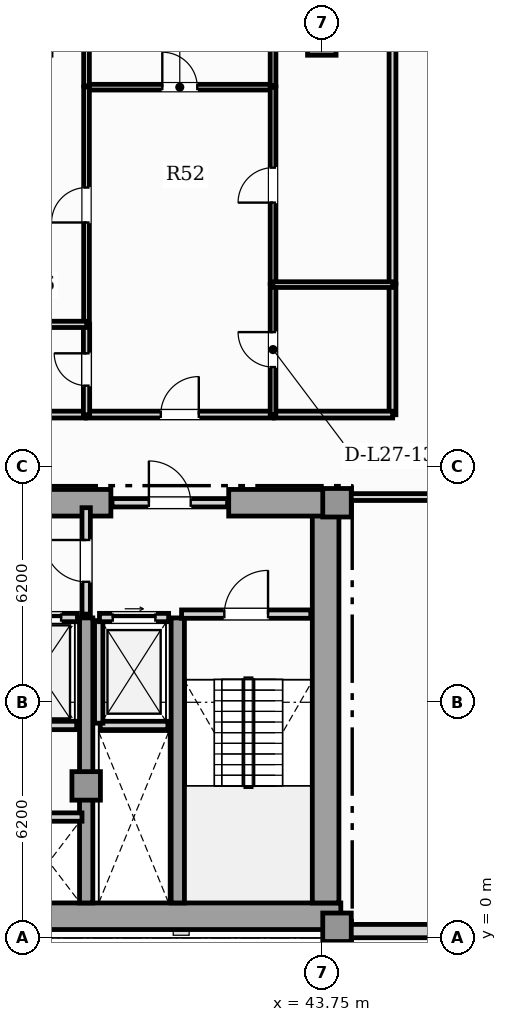
"""IFC4 building model, lengths in metres.
Left out: names, types, materials, properties, quantities, classifications, styles, units other than length and angle.
Written with IfcOpenShell. Run it as: python <this file> out.ifc"""

import sys

from ifc_helpers import new_model, si_unit, direction, frame, frame_2d, origin, origin_2d, place, context, subcontext, project, spatial, rectangle, extrude, element, fill, save


model = new_model("IFC4")
c1 = context("Model", 3, precision=1e-05, world=origin(), true_north=direction((0.0, 1.0)))
c2 = subcontext(c1, "Body", "Model", "MODEL_VIEW")
j1 = project(units=[si_unit("LENGTHUNIT", "METRE"), si_unit("PLANEANGLEUNIT", "RADIAN")], contexts=[c1])
p1 = place(None, origin())
s1 = spatial("IfcSite", under=j1, at=p1, CompositionType="ELEMENT")
p2 = place(p1, origin())
s2 = spatial("IfcBuilding", under=s1, at=p2, CompositionType="ELEMENT")
p3 = place(p2, frame((0.0, 0.0, 111.85)))
s3 = spatial("IfcBuildingStorey", under=s2, at=p3, CompositionType="ELEMENT", Elevation=111.85)
p4 = place(p3, frame((13.25, 0.57, 0.0), z_axis=(0.0, 0.0, 1.0), x_axis=(1.0, 0.0, 0.0)))
e1 = element("IfcWall", 1, at=p4, inside=s3, PredefinedType="SHEAR", context=c2, shape_type="SweptSolid", body=[
    extrude(rectangle(XDim=31.0, YDim=0.7, at=frame_2d((15.5, 0.0))), origin(), (0.0, 0.0, 1.0), 3.6),
])
p5 = place(p3, frame((43.85, 0.92, 0.0), z_axis=(0.0, 0.0, 1.0), x_axis=(0.0, 1.0, 0.0)))
e2 = element("IfcWall", 2, at=p5, inside=s3, PredefinedType="SHEAR", context=c2, shape_type="SweptSolid", body=[
    extrude(rectangle(XDim=10.53, YDim=0.7, at=frame_2d((5.265, 0.0))), origin(), (0.0, 0.0, 1.0), 3.6),
])
p6 = place(p3, frame((30.9, 11.45, 0.0), z_axis=(0.0, 0.0, 1.0), x_axis=(1.0, 0.0, 0.0)))
e3 = element("IfcWall", 3, at=p6, inside=s3, PredefinedType="SHEAR", context=c2, shape_type="SweptSolid", body=[
    extrude(rectangle(XDim=7.3, YDim=0.7, at=frame_2d((3.65, 0.0))), origin(), (0.0, 0.0, 1.0), 3.6),
])
p7 = place(p3, frame((41.3, 11.45, 0.0), z_axis=(0.0, 0.0, 1.0), x_axis=(1.0, 0.0, 0.0)))
e4 = element("IfcWall", 4, at=p7, inside=s3, PredefinedType="SHEAR", context=c2, shape_type="SweptSolid", body=[
    extrude(rectangle(XDim=2.95, YDim=0.7, at=frame_2d((1.475, 0.0))), origin(), (0.0, 0.0, 1.0), 3.6),
])
for number, where, z_axis, x_axis in (
    (5, (37.55, 0.92, 0.0), (0.0, 0.0, 1.0), (0.0, 1.0, 0.0)),
    (6, (39.96, 0.92, 0.0), (0.0, 0.0, 1.0), (0.0, 1.0, 0.0)),
):
    element("IfcWall", number, at=place(p3, frame(where, z_axis=z_axis, x_axis=x_axis)), inside=s3, PredefinedType="SHEAR", context=c2, shape_type="SweptSolid", body=[
        extrude(rectangle(XDim=7.5, YDim=0.35, at=frame_2d((3.75, 0.0))), origin(), (0.0, 0.0, 1.0), 3.6),
    ])
for number, where, z_axis, x_axis in (
    (7, (44.15, 0.28, 0.0), (0.0, 0.0, 1.0), (1.0, 0.0, 0.0)),
    (8, (44.15, 11.45, 0.0), (0.0, 0.0, 1.0), (1.0, 0.0, 0.0)),
    (9, (37.55, 4.0, 0.0), (0.0, 0.0, 1.0), (1.0, 0.0, 0.0)),
    (10, (43.75, 23.6, 0.0), (0.0, 0.0, 1.0), (1.0, 0.0, 0.0)),
):
    element("IfcColumn", number, at=place(p3, frame(where, z_axis=z_axis, x_axis=x_axis)), inside=s3, PredefinedType="COLUMN", context=c2, shape_type="SweptSolid", body=[
        extrude(rectangle(XDim=0.75, YDim=0.75, at=origin_2d()), origin(), (0.0, 0.0, 1.0), 3.85),
    ])
p8 = place(p3, frame((44.25, 0.18, 0.0), z_axis=(0.0, 0.0, 1.0), x_axis=(1.0, 0.0, 0.0)))
e11 = element("IfcWall", 11, at=p8, inside=s3, PredefinedType="SOLIDWALL", context=c2, shape_type="SweptSolid", body=[
    extrude(rectangle(XDim=7.41, YDim=0.35, at=frame_2d((3.705, 0.0))), origin(), (0.0, 0.0, 1.0), 3.6),
])
p9 = place(p8, frame((2.88, 0.0, 0.88)))
e12 = element("IfcOpeningElement", 12, at=p9, cuts=e11, PredefinedType="OPENING", context=c2, shape_type="SweptSolid", body=[
    extrude(rectangle(XDim=1.65, YDim=2.0, at=frame_2d((0.825, 1.0))), frame((0.0, 0.185, 0.0), z_axis=(0.0, -1.0, 0.0), x_axis=(1.0, 0.0, 0.0)), (0.0, 0.0, 1.0), 0.37),
])
p10 = place(p3, frame((37.92, 5.59, 0.0), z_axis=(0.0, 0.0, 1.0), x_axis=(1.0, 0.0, 0.0)))
e13 = element("IfcWall", 13, at=p10, inside=s3, PredefinedType="SOLIDWALL", context=c2, shape_type="SweptSolid", body=[
    extrude(rectangle(XDim=1.78, YDim=0.22, at=frame_2d((0.89, 0.0))), origin(), (0.0, 0.0, 1.0), 3.6),
])
p11 = place(p3, frame((37.88, 5.65, 0.0), z_axis=(0.0, 0.0, 1.0), x_axis=(0.0, 1.0, 0.0)))
e14 = element("IfcWall", 14, at=p11, inside=s3, PredefinedType="SOLIDWALL", context=c2, shape_type="SweptSolid", body=[
    extrude(rectangle(XDim=2.7, YDim=0.22, at=frame_2d((1.35, 0.0))), origin(), (0.0, 0.0, 1.0), 3.6),
])
p12 = place(p3, frame((37.9, 8.43, 0.0), z_axis=(0.0, 0.0, 1.0), x_axis=(1.0, 0.0, 0.0)))
e15 = element("IfcWall", 15, at=p12, inside=s3, PredefinedType="SOLIDWALL", context=c2, shape_type="SweptSolid", body=[
    extrude(rectangle(XDim=1.82, YDim=0.22, at=frame_2d((0.91, 0.0))), origin(), (0.0, 0.0, 1.0), 3.6),
])
p13 = place(p12, frame((0.35, 0.0, 0.0)))
e16 = element("IfcOpeningElement", 16, at=p13, cuts=e15, PredefinedType="OPENING", context=c2, shape_type="SweptSolid", body=[
    extrude(rectangle(XDim=1.12, YDim=2.25, at=frame_2d((0.56, 1.125))), frame((0.0, 0.12, 0.0), z_axis=(0.0, -1.0, 0.0), x_axis=(1.0, 0.0, 0.0)), (0.0, 0.0, 1.0), 0.24),
])
p14 = place(p3, frame((35.3, 5.59, 0.0), z_axis=(0.0, 0.0, 1.0), x_axis=(1.0, 0.0, 0.0)))
e17 = element("IfcWall", 17, at=p14, inside=s3, PredefinedType="SOLIDWALL", context=c2, shape_type="SweptSolid", body=[
    extrude(rectangle(XDim=2.0, YDim=0.22, at=frame_2d((1.0, 0.0))), origin(), (0.0, 0.0, 1.0), 3.6),
])
p15 = place(p3, frame((35.28, 8.43, 0.0), z_axis=(0.0, 0.0, 1.0), x_axis=(1.0, 0.0, 0.0)))
e18 = element("IfcWall", 18, at=p15, inside=s3, PredefinedType="SOLIDWALL", context=c2, shape_type="SweptSolid", body=[
    extrude(rectangle(XDim=2.04, YDim=0.22, at=frame_2d((1.02, 0.0))), origin(), (0.0, 0.0, 1.0), 3.6),
])
p16 = place(p15, frame((0.43, 0.0, 0.0)))
e19 = element("IfcOpeningElement", 19, at=p16, cuts=e18, PredefinedType="OPENING", context=c2, shape_type="SweptSolid", body=[
    extrude(rectangle(XDim=1.18, YDim=2.2, at=frame_2d((0.59, 1.1))), frame((0.0, 0.12, 0.0), z_axis=(0.0, -1.0, 0.0), x_axis=(1.0, 0.0, 0.0)), (0.0, 0.0, 1.0), 0.24),
])
p17 = place(p3, frame((35.7, 3.18, 0.0), z_axis=(0.0, 0.0, 1.0), x_axis=(1.0, 0.0, 0.0)))
e20 = element("IfcWall", 20, at=p17, inside=s3, PredefinedType="SOLIDWALL", context=c2, shape_type="SweptSolid", body=[
    extrude(rectangle(XDim=1.74, YDim=0.22, at=frame_2d((0.87, 0.0))), origin(), (0.0, 0.0, 1.0), 3.6),
])
p18 = place(p3, frame((40.06, 8.52, 0.0), z_axis=(0.0, 0.0, 1.0), x_axis=(1.0, 0.0, 0.0)))
e21 = element("IfcWall", 21, at=p18, inside=s3, PredefinedType="SOLIDWALL", context=c2, shape_type="SweptSolid", body=[
    extrude(rectangle(XDim=3.4, YDim=0.22, at=frame_2d((1.7, 0.0))), origin(), (0.0, 0.0, 1.0), 3.6),
])
p19 = place(p18, frame((1.125, 0.0, 0.0)))
e22 = element("IfcOpeningElement", 22, at=p19, cuts=e21, PredefinedType="OPENING", context=c2, shape_type="SweptSolid", body=[
    extrude(rectangle(XDim=1.15, YDim=2.2, at=frame_2d((0.575, 1.1))), frame((0.0, 0.12, 0.0), z_axis=(0.0, -1.0, 0.0), x_axis=(1.0, 0.0, 0.0)), (0.0, 0.0, 1.0), 0.24),
])
p20 = place(p3, frame((37.55, 8.52, 0.0), z_axis=(0.0, 0.0, 1.0), x_axis=(0.0, 1.0, 0.0)))
e23 = element("IfcWall", 23, at=p20, inside=s3, PredefinedType="SOLIDWALL", context=c2, shape_type="SweptSolid", body=[
    extrude(rectangle(XDim=2.8, YDim=0.22, at=frame_2d((1.4, 0.0))), origin(), (0.0, 0.0, 1.0), 3.055),
])
p21 = place(p20, frame((0.85, 0.0, 0.0)))
e24 = element("IfcOpeningElement", 24, at=p21, cuts=e23, PredefinedType="OPENING", context=c2, shape_type="SweptSolid", body=[
    extrude(rectangle(XDim=1.1, YDim=2.2, at=frame_2d((0.55, 1.1))), frame((0.0, 0.12, 0.0), z_axis=(0.0, -1.0, 0.0), x_axis=(1.0, 0.0, 0.0)), (0.0, 0.0, 1.0), 0.24),
])
p22 = place(p3, frame((38.23, 11.45, 0.0), z_axis=(0.0, 0.0, 1.0), x_axis=(1.0, 0.0, 0.0)))
e25 = element("IfcWall", 25, at=p22, inside=s3, PredefinedType="SOLIDWALL", context=c2, shape_type="SweptSolid", body=[
    extrude(rectangle(XDim=3.04, YDim=0.22, at=frame_2d((1.52, 0.0))), origin(), (0.0, 0.0, 1.0), 3.6),
])
p23 = place(p22, frame((0.97, 0.0, 0.0)))
e26 = element("IfcOpeningElement", 26, at=p23, cuts=e25, PredefinedType="OPENING", context=c2, shape_type="SweptSolid", body=[
    extrude(rectangle(XDim=1.1, YDim=2.2, at=frame_2d((0.55, 1.1))), frame((0.0, 0.12, 0.0), z_axis=(0.0, -1.0, 0.0), x_axis=(1.0, 0.0, 0.0)), (0.0, 0.0, 1.0), 0.24),
])
p24 = place(p3, frame((44.355, 11.6, 0.0), z_axis=(0.0, 0.0, 1.0), x_axis=(1.0, 0.0, 0.0)))
e27 = element("IfcWall", 27, at=p24, inside=s3, PredefinedType="PARTITIONING", context=c2, shape_type="SweptSolid", body=[
    extrude(rectangle(XDim=10.335, YDim=0.18, at=frame_2d((5.167, 0.0))), origin(), (0.0, 0.0, 1.0), 3.6),
])
p25 = place(p24, frame((4.667, 0.0, 0.0)))
e28 = element("IfcOpeningElement", 28, at=p25, cuts=e27, PredefinedType="OPENING", context=c2, shape_type="SweptSolid", body=[
    extrude(rectangle(XDim=1.0, YDim=2.15, at=frame_2d((0.5, 1.075))), frame((0.0, 0.1, 0.0), z_axis=(0.0, -1.0, 0.0), x_axis=(1.0, 0.0, 0.0)), (0.0, 0.0, 1.0), 0.2),
])
p26 = place(p3, frame((37.554, 13.77, 0.0), z_axis=(0.0, 0.0, 1.0), x_axis=(1.0, 0.0, 0.0)))
e29 = element("IfcWall", 29, at=p26, inside=s3, PredefinedType="PARTITIONING", context=c2, shape_type="SweptSolid", body=[
    extrude(rectangle(XDim=4.917, YDim=0.18, at=frame_2d((2.459, 0.0))), origin(), (0.0, 0.0, 1.0), 3.6),
])
p27 = place(p26, frame((1.959, 0.0, 0.0)))
e30 = element("IfcOpeningElement", 30, at=p27, cuts=e29, PredefinedType="OPENING", context=c2, shape_type="SweptSolid", body=[
    extrude(rectangle(XDim=1.0, YDim=2.15, at=frame_2d((0.5, 1.075))), frame((0.0, 0.1, 0.0), z_axis=(0.0, -1.0, 0.0), x_axis=(1.0, 0.0, 0.0)), (0.0, 0.0, 1.0), 0.2),
])
p28 = place(p3, frame((34.405, 13.77, 0.0), z_axis=(0.0, 0.0, 1.0), x_axis=(1.0, 0.0, 0.0)))
e31 = element("IfcWall", 31, at=p28, inside=s3, PredefinedType="PARTITIONING", context=c2, shape_type="SweptSolid", body=[
    extrude(rectangle(XDim=3.119, YDim=0.18, at=frame_2d((1.56, 0.0))), origin(), (0.0, 0.0, 1.0), 3.6),
])
p29 = place(p3, frame((45.61, 13.765, 0.0), z_axis=(0.0, 0.0, 1.0), x_axis=(0.0, 1.0, 0.0)))
e32 = element("IfcWall", 32, at=p29, inside=s3, PredefinedType="PARTITIONING", context=c2, shape_type="SweptSolid", body=[
    extrude(rectangle(XDim=3.43, YDim=0.18, at=frame_2d((1.715, 0.0))), origin(), (0.0, 0.0, 1.0), 3.6),
])
p30 = place(p3, frame((42.502, 13.77, 0.0), z_axis=(0.0, 0.0, 1.0), x_axis=(1.0, 0.0, 0.0)))
e33 = element("IfcWall", 33, at=p30, inside=s3, PredefinedType="PARTITIONING", context=c2, shape_type="SweptSolid", body=[
    extrude(rectangle(XDim=3.113, YDim=0.18, at=frame_2d((1.557, 0.0))), origin(), (0.0, 0.0, 1.0), 3.6),
])
p31 = place(p3, frame((45.61, 17.225, 0.0), z_axis=(0.0, 0.0, 1.0), x_axis=(0.0, 1.0, 0.0)))
e34 = element("IfcWall", 34, at=p31, inside=s3, PredefinedType="PARTITIONING", context=c2, shape_type="SweptSolid", body=[
    extrude(rectangle(XDim=10.67, YDim=0.18, at=frame_2d((5.335, 0.0))), origin(), (0.0, 0.0, 1.0), 3.6),
])
p32 = place(p3, frame((37.554, 22.385, 0.0), z_axis=(0.0, 0.0, 1.0), x_axis=(1.0, 0.0, 0.0)))
e35 = element("IfcWall", 35, at=p32, inside=s3, PredefinedType="PARTITIONING", context=c2, shape_type="SweptSolid", body=[
    extrude(rectangle(XDim=4.917, YDim=0.15, at=frame_2d((2.459, 0.0))), origin(), (0.0, 0.0, 1.0), 3.6),
])
p33 = place(p32, frame((1.999, 0.0, 0.0)))
e36 = element("IfcOpeningElement", 36, at=p33, cuts=e35, PredefinedType="OPENING", context=c2, shape_type="SweptSolid", body=[
    extrude(rectangle(XDim=0.92, YDim=2.1, at=frame_2d((0.46, 1.05))), frame((0.0, 0.085, 0.0), z_axis=(0.0, -1.0, 0.0), x_axis=(1.0, 0.0, 0.0)), (0.0, 0.0, 1.0), 0.17),
])
p34 = place(p3, frame((37.559, 13.765, 0.0), z_axis=(0.0, 0.0, 1.0), x_axis=(0.0, 1.0, 0.0)))
e37 = element("IfcWall", 37, at=p34, inside=s3, PredefinedType="PLUMBINGWALL", context=c2, shape_type="SweptSolid", body=[
    extrude(rectangle(XDim=2.383, YDim=0.165, at=frame_2d((1.192, 0.0))), origin(), (0.0, 0.0, 1.0), 3.6),
])
p35 = place(p34, frame((0.767, 0.0, 0.0)))
e38 = element("IfcOpeningElement", 38, at=p35, cuts=e37, PredefinedType="OPENING", context=c2, shape_type="SweptSolid", body=[
    extrude(rectangle(XDim=0.85, YDim=2.1, at=frame_2d((0.425, 1.05))), frame((0.0, 0.093, 0.0), z_axis=(0.0, -1.0, 0.0), x_axis=(1.0, 0.0, 0.0)), (0.0, 0.0, 1.0), 0.185),
])
p36 = place(p3, frame((37.559, 16.178, 0.0), z_axis=(0.0, 0.0, 1.0), x_axis=(0.0, 1.0, 0.0)))
e39 = element("IfcWall", 39, at=p36, inside=s3, PredefinedType="PARTITIONING", context=c2, shape_type="SweptSolid", body=[
    extrude(rectangle(XDim=6.211, YDim=0.15, at=frame_2d((3.105, 0.0))), origin(), (0.0, 0.0, 1.0), 3.6),
])
p37 = place(p36, frame((2.646, 0.0, 0.0)))
e40 = element("IfcOpeningElement", 40, at=p37, cuts=e39, PredefinedType="OPENING", context=c2, shape_type="SweptSolid", body=[
    extrude(rectangle(XDim=0.92, YDim=2.1, at=frame_2d((0.46, 1.05))), frame((0.0, 0.085, 0.0), z_axis=(0.0, -1.0, 0.0), x_axis=(1.0, 0.0, 0.0)), (0.0, 0.0, 1.0), 0.17),
])
p38 = place(p3, frame((42.467, 13.765, 0.0), z_axis=(0.0, 0.0, 1.0), x_axis=(0.0, 1.0, 0.0)))
e41 = element("IfcWall", 41, at=p38, inside=s3, PredefinedType="PARTITIONING", context=c2, shape_type="SweptSolid", body=[
    extrude(rectangle(XDim=3.43, YDim=0.15, at=frame_2d((1.715, 0.0))), origin(), (0.0, 0.0, 1.0), 3.6),
])
p39 = place(p38, frame((1.255, 0.0, 0.0)))
e42 = element("IfcOpeningElement", 42, at=p39, cuts=e41, PredefinedType="OPENING", context=c2, shape_type="SweptSolid", body=[
    extrude(rectangle(XDim=0.92, YDim=2.1, at=frame_2d((0.46, 1.05))), frame((0.0, 0.085, 0.0), z_axis=(0.0, -1.0, 0.0), x_axis=(1.0, 0.0, 0.0)), (0.0, 0.0, 1.0), 0.17),
])
p40 = place(p3, frame((42.467, 17.225, 0.0), z_axis=(0.0, 0.0, 1.0), x_axis=(0.0, 1.0, 0.0)))
e43 = element("IfcWall", 43, at=p40, inside=s3, PredefinedType="PARTITIONING", context=c2, shape_type="SweptSolid", body=[
    extrude(rectangle(XDim=5.165, YDim=0.15, at=frame_2d((2.583, 0.0))), origin(), (0.0, 0.0, 1.0), 3.6),
])
p41 = place(p40, frame((2.122, 0.0, 0.0)))
e44 = element("IfcOpeningElement", 44, at=p41, cuts=e43, PredefinedType="OPENING", context=c2, shape_type="SweptSolid", body=[
    extrude(rectangle(XDim=0.92, YDim=2.1, at=frame_2d((0.46, 1.05))), frame((0.0, 0.085, 0.0), z_axis=(0.0, -1.0, 0.0), x_axis=(1.0, 0.0, 0.0)), (0.0, 0.0, 1.0), 0.17),
])
p42 = place(p3, frame((37.559, 22.419, 0.0), z_axis=(0.0, 0.0, 1.0), x_axis=(0.0, 1.0, 0.0)))
e45 = element("IfcWall", 45, at=p42, inside=s3, PredefinedType="PARTITIONING", context=c2, shape_type="SweptSolid", body=[
    extrude(rectangle(XDim=11.085, YDim=0.15, at=frame_2d((5.543, 0.0))), origin(), (0.0, 0.0, 1.0), 3.6),
])
p43 = place(p42, frame((3.42, 0.0, 0.0)))
e46 = element("IfcOpeningElement", 46, at=p43, cuts=e45, PredefinedType="OPENING", context=c2, shape_type="SweptSolid", body=[
    extrude(rectangle(XDim=0.92, YDim=2.1, at=frame_2d((0.46, 1.05))), frame((0.0, 0.085, 0.0), z_axis=(0.0, -1.0, 0.0), x_axis=(1.0, 0.0, 0.0)), (0.0, 0.0, 1.0), 0.17),
])
p44 = place(p3, frame((42.467, 22.419, 0.0), z_axis=(0.0, 0.0, 1.0), x_axis=(0.0, 1.0, 0.0)))
e47 = element("IfcWall", 47, at=p44, inside=s3, PredefinedType="PARTITIONING", context=c2, shape_type="SweptSolid", body=[
    extrude(rectangle(XDim=11.085, YDim=0.15, at=frame_2d((5.543, 0.0))), origin(), (0.0, 0.0, 1.0), 3.6),
])
p45 = place(p44, frame((3.42, 0.0, 0.0)))
e48 = element("IfcOpeningElement", 48, at=p45, cuts=e47, PredefinedType="OPENING", context=c2, shape_type="SweptSolid", body=[
    extrude(rectangle(XDim=0.92, YDim=2.1, at=frame_2d((0.46, 1.05))), frame((0.0, 0.085, 0.0), z_axis=(0.0, -1.0, 0.0), x_axis=(1.0, 0.0, 0.0)), (0.0, 0.0, 1.0), 0.17),
])
p46 = place(p3, frame((34.365, 16.143, 0.0), z_axis=(0.0, 0.0, 1.0), x_axis=(1.0, 0.0, 0.0)))
e49 = element("IfcWall", 49, at=p46, inside=s3, PredefinedType="PLUMBINGWALL", context=c2, shape_type="SweptSolid", body=[
    extrude(rectangle(XDim=3.199, YDim=0.165, at=frame_2d((1.6, 0.0))), origin(), (0.0, 0.0, 1.0), 3.6),
])
p47 = place(p3, frame((42.462, 17.19, 0.0), z_axis=(0.0, 0.0, 1.0), x_axis=(1.0, 0.0, 0.0)))
e50 = element("IfcWall", 50, at=p47, inside=s3, PredefinedType="PARTITIONING", context=c2, shape_type="SweptSolid", body=[
    extrude(rectangle(XDim=3.153, YDim=0.15, at=frame_2d((1.577, 0.0))), origin(), (0.0, 0.0, 1.0), 3.6),
])
p48 = place(p13, origin())
e51 = element("IfcDoor", 51, at=p48, inside=s3, OperationType="SLIDING_TO_RIGHT", PredefinedType="DOOR", context=c2, shape_type="SweptSolid", body=[
    extrude(rectangle(XDim=1.12, YDim=2.25, at=frame_2d((0.56, 1.125))), frame((0.0, 0.025, 0.0), z_axis=(0.0, -1.0, 0.0), x_axis=(1.0, 0.0, 0.0)), (0.0, 0.0, 1.0), 0.05),
])
fill(e16, e51)
p49 = place(p16, origin())
e52 = element("IfcDoor", 52, at=p49, inside=s3, OperationType="SLIDING_TO_LEFT", PredefinedType="DOOR", context=c2, shape_type="SweptSolid", body=[
    extrude(rectangle(XDim=1.18, YDim=2.2, at=frame_2d((0.59, 1.1))), frame((0.0, 0.025, 0.0), z_axis=(0.0, -1.0, 0.0), x_axis=(1.0, 0.0, 0.0)), (0.0, 0.0, 1.0), 0.05),
])
fill(e19, e52)
p50 = place(p19, origin())
e53 = element("IfcDoor", 53, at=p50, inside=s3, OperationType="SINGLE_SWING_RIGHT", PredefinedType="DOOR", context=c2, shape_type="SweptSolid", body=[
    extrude(rectangle(XDim=1.15, YDim=2.2, at=frame_2d((0.575, 1.1))), frame((0.0, 0.025, 0.0), z_axis=(0.0, -1.0, 0.0), x_axis=(1.0, 0.0, 0.0)), (0.0, 0.0, 1.0), 0.05),
])
fill(e22, e53)
p51 = place(p21, origin())
e54 = element("IfcDoor", 54, at=p51, inside=s3, OperationType="SINGLE_SWING_RIGHT", PredefinedType="DOOR", context=c2, shape_type="SweptSolid", body=[
    extrude(rectangle(XDim=1.1, YDim=2.2, at=frame_2d((0.55, 1.1))), frame((0.0, 0.025, 0.0), z_axis=(0.0, -1.0, 0.0), x_axis=(1.0, 0.0, 0.0)), (0.0, 0.0, 1.0), 0.05),
])
fill(e24, e54)
p52 = place(p23, origin())
e55 = element("IfcDoor", 55, at=p52, inside=s3, OperationType="SINGLE_SWING_LEFT", PredefinedType="DOOR", context=c2, shape_type="SweptSolid", body=[
    extrude(rectangle(XDim=1.1, YDim=2.2, at=frame_2d((0.55, 1.1))), frame((0.0, 0.025, 0.0), z_axis=(0.0, -1.0, 0.0), x_axis=(1.0, 0.0, 0.0)), (0.0, 0.0, 1.0), 0.05),
])
fill(e26, e55)
p53 = place(p27, origin())
e56 = element("IfcDoor", 56, at=p53, inside=s3, OperationType="SINGLE_SWING_RIGHT", PredefinedType="DOOR", context=c2, shape_type="SweptSolid", body=[
    extrude(rectangle(XDim=1.0, YDim=2.15, at=frame_2d((0.5, 1.075))), frame((0.0, 0.025, 0.0), z_axis=(0.0, -1.0, 0.0), x_axis=(1.0, 0.0, 0.0)), (0.0, 0.0, 1.0), 0.05),
])
fill(e30, e56)
p54 = place(p33, origin())
e57 = element("IfcDoor", 57, at=p54, inside=s3, OperationType="SINGLE_SWING_LEFT", PredefinedType="DOOR", context=c2, shape_type="SweptSolid", body=[
    extrude(rectangle(XDim=0.92, YDim=2.1, at=frame_2d((0.46, 1.05))), frame((0.0, 0.025, 0.0), z_axis=(0.0, -1.0, 0.0), x_axis=(1.0, 0.0, 0.0)), (0.0, 0.0, 1.0), 0.05),
])
fill(e36, e57)
p55 = place(p35, origin())
e58 = element("IfcDoor", 58, at=p55, inside=s3, OperationType="SINGLE_SWING_RIGHT", PredefinedType="DOOR", context=c2, shape_type="SweptSolid", body=[
    extrude(rectangle(XDim=0.85, YDim=2.1, at=frame_2d((0.425, 1.05))), frame((0.0, 0.025, 0.0), z_axis=(0.0, -1.0, 0.0), x_axis=(1.0, 0.0, 0.0)), (0.0, 0.0, 1.0), 0.05),
])
fill(e38, e58)
p56 = place(p37, origin())
e59 = element("IfcDoor", 59, at=p56, inside=s3, OperationType="SINGLE_SWING_LEFT", PredefinedType="DOOR", context=c2, shape_type="SweptSolid", body=[
    extrude(rectangle(XDim=0.92, YDim=2.1, at=frame_2d((0.46, 1.05))), frame((0.0, 0.025, 0.0), z_axis=(0.0, -1.0, 0.0), x_axis=(1.0, 0.0, 0.0)), (0.0, 0.0, 1.0), 0.05),
])
fill(e40, e59)
p57 = place(p39, origin())
e60 = element("IfcDoor", 60, at=p57, inside=s3, OperationType="SINGLE_SWING_RIGHT", PredefinedType="DOOR", context=c2, shape_type="SweptSolid", body=[
    extrude(rectangle(XDim=0.92, YDim=2.1, at=frame_2d((0.46, 1.05))), frame((0.0, 0.025, 0.0), z_axis=(0.0, -1.0, 0.0), x_axis=(1.0, 0.0, 0.0)), (0.0, 0.0, 1.0), 0.05),
])
fill(e42, e60)
p58 = place(p41, origin())
e61 = element("IfcDoor", 61, at=p58, inside=s3, OperationType="SINGLE_SWING_LEFT", PredefinedType="DOOR", context=c2, shape_type="SweptSolid", body=[
    extrude(rectangle(XDim=0.92, YDim=2.1, at=frame_2d((0.46, 1.05))), frame((0.0, 0.025, 0.0), z_axis=(0.0, -1.0, 0.0), x_axis=(1.0, 0.0, 0.0)), (0.0, 0.0, 1.0), 0.05),
])
fill(e44, e61)
save(model, sys.argv[1])
